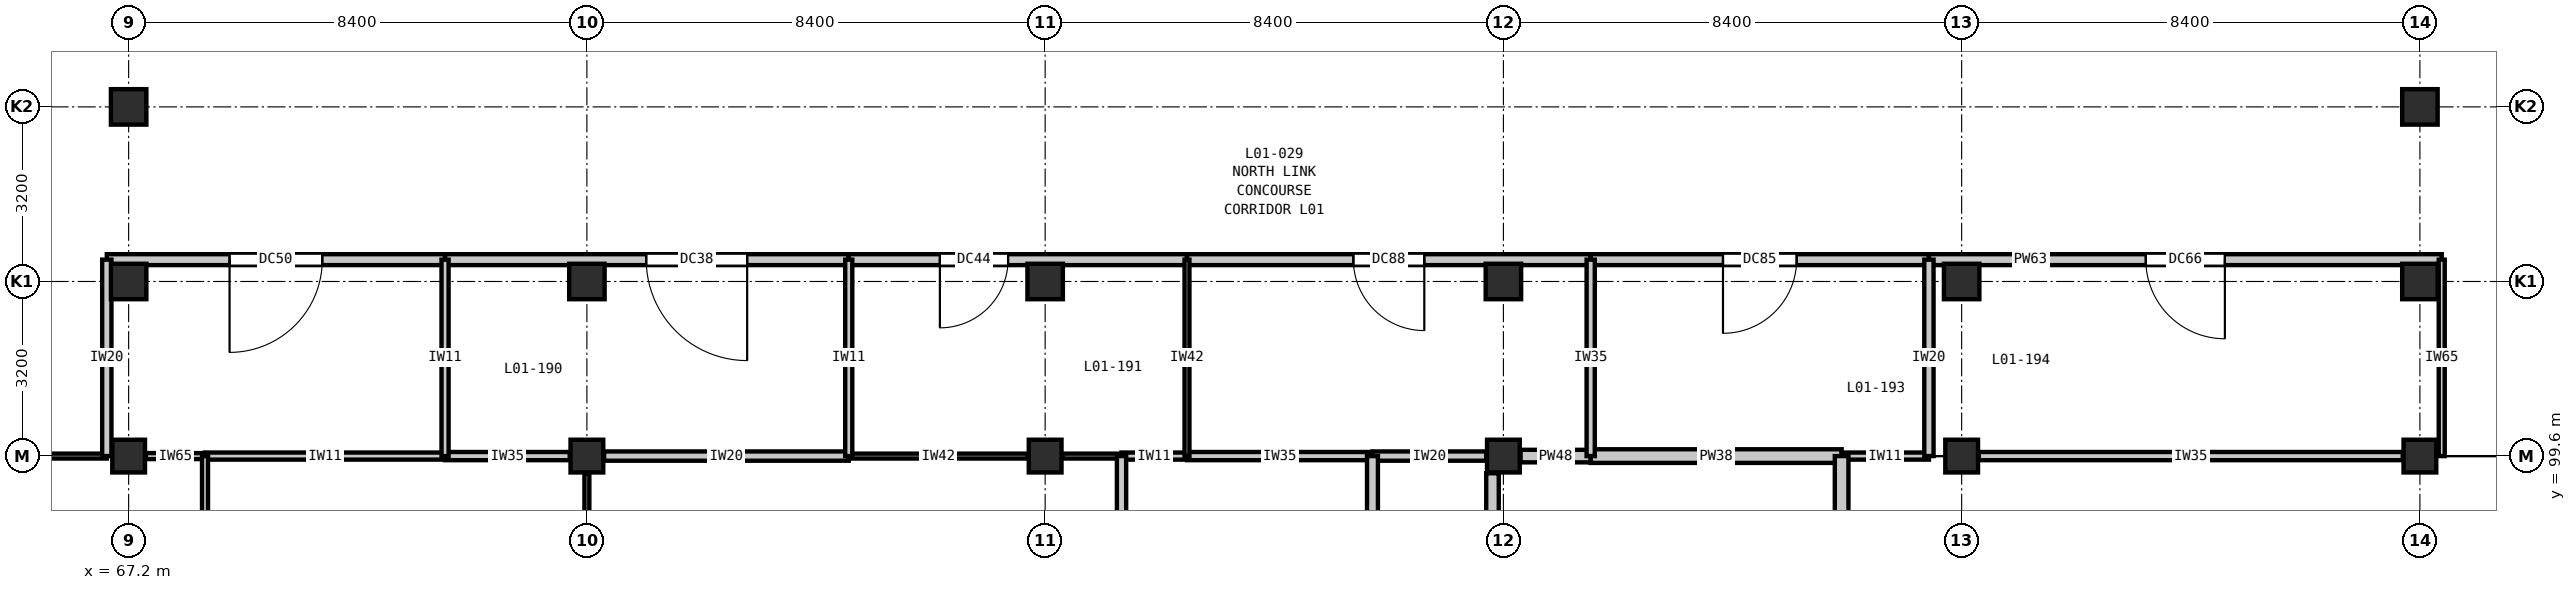
"""IFC4 building model, lengths in metres.
Left out: names, types, materials, properties, quantities, classifications, styles, units other than length and angle.
Written with IfcOpenShell. Run it as: python <this file> out.ifc"""

import sys

from ifc_helpers import new_model, si_unit, direction, frame, frame_2d, origin, origin_2d, place, context, subcontext, project, spatial, rectangle, extrude, element, fill, save


model = new_model("IFC4")
c1 = context("Model", 3, precision=1e-05, world=origin(), true_north=direction((0.0, 1.0)))
c2 = subcontext(c1, "Body", "Model", "MODEL_VIEW")
j1 = project(units=[si_unit("LENGTHUNIT", "METRE"), si_unit("PLANEANGLEUNIT", "RADIAN")], contexts=[c1])
p1 = place(None, origin())
s1 = spatial("IfcSite", under=j1, at=p1, CompositionType="ELEMENT")
p2 = place(p1, origin())
s2 = spatial("IfcBuilding", under=s1, at=p2, CompositionType="ELEMENT")
p3 = place(p2, frame((0.0, 0.0, 5.4)))
s3 = spatial("IfcBuildingStorey", under=s2, at=p3, CompositionType="ELEMENT", Elevation=5.4)
p4 = place(p3, frame((67.2, 99.6, 0.0), z_axis=(0.0, 0.0, 1.0), x_axis=(1.0, 0.0, 0.0)))
e1 = element("IfcColumn", 1, at=p4, inside=s3, PredefinedType="COLUMN", context=c2, shape_type="SweptSolid", body=[
    extrude(rectangle(XDim=0.6, YDim=0.6, at=origin_2d()), origin(), (0.0, 0.0, 1.0), 5.4),
])
for number, where, z_axis, x_axis in (
    (2, (67.2, 102.8, 0.0), (0.0, 0.0, 1.0), (1.0, 0.0, 0.0)),
    (3, (67.2, 106.0, 0.0), (0.0, 0.0, 1.0), (1.0, 0.0, 0.0)),
):
    element("IfcColumn", number, at=place(p3, frame(where, z_axis=z_axis, x_axis=x_axis)), inside=s3, PredefinedType="COLUMN", context=c2, shape_type="SweptSolid", body=[
        extrude(rectangle(XDim=0.65, YDim=0.65, at=origin_2d()), origin(), (0.0, 0.0, 1.0), 5.4),
    ])
p5 = place(p3, frame((75.6, 99.6, 0.0), z_axis=(0.0, 0.0, 1.0), x_axis=(1.0, 0.0, 0.0)))
e4 = element("IfcColumn", 4, at=p5, inside=s3, PredefinedType="COLUMN", context=c2, shape_type="SweptSolid", body=[
    extrude(rectangle(XDim=0.6, YDim=0.6, at=origin_2d()), origin(), (0.0, 0.0, 1.0), 5.4),
])
p6 = place(p3, frame((75.6, 102.8, 0.0), z_axis=(0.0, 0.0, 1.0), x_axis=(1.0, 0.0, 0.0)))
e5 = element("IfcColumn", 5, at=p6, inside=s3, PredefinedType="COLUMN", context=c2, shape_type="SweptSolid", body=[
    extrude(rectangle(XDim=0.65, YDim=0.65, at=origin_2d()), origin(), (0.0, 0.0, 1.0), 5.4),
])
p7 = place(p3, frame((84.0, 99.6, 0.0), z_axis=(0.0, 0.0, 1.0), x_axis=(1.0, 0.0, 0.0)))
e6 = element("IfcColumn", 6, at=p7, inside=s3, PredefinedType="COLUMN", context=c2, shape_type="SweptSolid", body=[
    extrude(rectangle(XDim=0.6, YDim=0.6, at=origin_2d()), origin(), (0.0, 0.0, 1.0), 5.4),
])
p8 = place(p3, frame((84.0, 102.8, 0.0), z_axis=(0.0, 0.0, 1.0), x_axis=(1.0, 0.0, 0.0)))
e7 = element("IfcColumn", 7, at=p8, inside=s3, PredefinedType="COLUMN", context=c2, shape_type="SweptSolid", body=[
    extrude(rectangle(XDim=0.65, YDim=0.65, at=origin_2d()), origin(), (0.0, 0.0, 1.0), 5.4),
])
p9 = place(p3, frame((92.4, 99.6, 0.0), z_axis=(0.0, 0.0, 1.0), x_axis=(1.0, 0.0, 0.0)))
e8 = element("IfcColumn", 8, at=p9, inside=s3, PredefinedType="COLUMN", context=c2, shape_type="SweptSolid", body=[
    extrude(rectangle(XDim=0.6, YDim=0.6, at=origin_2d()), origin(), (0.0, 0.0, 1.0), 5.4),
])
p10 = place(p3, frame((92.4, 102.8, 0.0), z_axis=(0.0, 0.0, 1.0), x_axis=(1.0, 0.0, 0.0)))
e9 = element("IfcColumn", 9, at=p10, inside=s3, PredefinedType="COLUMN", context=c2, shape_type="SweptSolid", body=[
    extrude(rectangle(XDim=0.65, YDim=0.65, at=origin_2d()), origin(), (0.0, 0.0, 1.0), 5.4),
])
p11 = place(p3, frame((100.8, 99.6, 0.0), z_axis=(0.0, 0.0, 1.0), x_axis=(1.0, 0.0, 0.0)))
e10 = element("IfcColumn", 10, at=p11, inside=s3, PredefinedType="COLUMN", context=c2, shape_type="SweptSolid", body=[
    extrude(rectangle(XDim=0.6, YDim=0.6, at=origin_2d()), origin(), (0.0, 0.0, 1.0), 5.4),
])
p12 = place(p3, frame((100.8, 102.8, 0.0), z_axis=(0.0, 0.0, 1.0), x_axis=(1.0, 0.0, 0.0)))
e11 = element("IfcColumn", 11, at=p12, inside=s3, PredefinedType="COLUMN", context=c2, shape_type="SweptSolid", body=[
    extrude(rectangle(XDim=0.65, YDim=0.65, at=origin_2d()), origin(), (0.0, 0.0, 1.0), 5.4),
])
p13 = place(p3, frame((109.2, 99.6, 0.0), z_axis=(0.0, 0.0, 1.0), x_axis=(1.0, 0.0, 0.0)))
e12 = element("IfcColumn", 12, at=p13, inside=s3, PredefinedType="COLUMN", context=c2, shape_type="SweptSolid", body=[
    extrude(rectangle(XDim=0.6, YDim=0.6, at=origin_2d()), origin(), (0.0, 0.0, 1.0), 5.4),
])
for number, where, z_axis, x_axis in (
    (13, (109.2, 102.8, 0.0), (0.0, 0.0, 1.0), (1.0, 0.0, 0.0)),
    (14, (109.2, 106.0, 0.0), (0.0, 0.0, 1.0), (1.0, 0.0, 0.0)),
):
    element("IfcColumn", number, at=place(p3, frame(where, z_axis=z_axis, x_axis=x_axis)), inside=s3, PredefinedType="COLUMN", context=c2, shape_type="SweptSolid", body=[
        extrude(rectangle(XDim=0.65, YDim=0.65, at=origin_2d()), origin(), (0.0, 0.0, 1.0), 5.4),
    ])
p14 = place(p3, frame((63.6, 99.6, 0.0), z_axis=(0.0, 0.0, 1.0), x_axis=(1.0, 0.0, 0.0)))
e15 = element("IfcWall", 15, at=p14, inside=s3, PredefinedType="PARTITIONING", context=c2, shape_type="SweptSolid", body=[
    extrude(rectangle(XDim=3.2, YDim=0.09, at=frame_2d((1.6, 0.0))), origin(), (0.0, 0.0, 1.0), 4.685),
])
p15 = place(p3, frame((67.515, 99.6, 0.0), z_axis=(0.0, 0.0, 1.0), x_axis=(1.0, 0.0, 0.0)))
e16 = element("IfcWall", 16, at=p15, inside=s3, PredefinedType="PARTITIONING", context=c2, shape_type="SweptSolid", body=[
    extrude(rectangle(XDim=1.085, YDim=0.11, at=frame_2d((0.542, 0.0))), origin(), (0.0, 0.0, 1.0), 4.685),
])
p16 = place(p3, frame((68.6, 99.6, 0.0), z_axis=(0.0, 0.0, 1.0), x_axis=(1.0, 0.0, 0.0)))
e17 = element("IfcWall", 17, at=p16, inside=s3, PredefinedType="PARTITIONING", context=c2, shape_type="SweptSolid", body=[
    extrude(rectangle(XDim=4.4, YDim=0.13, at=frame_2d((2.2, 0.0))), origin(), (0.0, 0.0, 1.0), 4.685),
])
p17 = place(p3, frame((73.0, 99.6, 0.0), z_axis=(0.0, 0.0, 1.0), x_axis=(1.0, 0.0, 0.0)))
e18 = element("IfcWall", 18, at=p17, inside=s3, PredefinedType="PARTITIONING", context=c2, shape_type="SweptSolid", body=[
    extrude(rectangle(XDim=2.285, YDim=0.15, at=frame_2d((1.143, 0.0))), origin(), (0.0, 0.0, 1.0), 4.685),
])
p18 = place(p3, frame((75.915, 99.6, 0.0), z_axis=(0.0, 0.0, 1.0), x_axis=(1.0, 0.0, 0.0)))
e19 = element("IfcWall", 19, at=p18, inside=s3, PredefinedType="PARTITIONING", context=c2, shape_type="SweptSolid", body=[
    extrude(rectangle(XDim=4.485, YDim=0.17, at=frame_2d((2.242, 0.0))), origin(), (0.0, 0.0, 1.0), 4.685),
])
p19 = place(p3, frame((80.4, 99.6, 0.0), z_axis=(0.0, 0.0, 1.0), x_axis=(1.0, 0.0, 0.0)))
e20 = element("IfcWall", 20, at=p19, inside=s3, PredefinedType="PARTITIONING", context=c2, shape_type="SweptSolid", body=[
    extrude(rectangle(XDim=3.285, YDim=0.09, at=frame_2d((1.643, 0.0))), origin(), (0.0, 0.0, 1.0), 4.685),
])
p20 = place(p3, frame((84.315, 99.6, 0.0), z_axis=(0.0, 0.0, 1.0), x_axis=(1.0, 0.0, 0.0)))
e21 = element("IfcWall", 21, at=p20, inside=s3, PredefinedType="PARTITIONING", context=c2, shape_type="SweptSolid", body=[
    extrude(rectangle(XDim=1.085, YDim=0.09, at=frame_2d((0.542, 0.0))), origin(), (0.0, 0.0, 1.0), 4.685),
])
p21 = place(p3, frame((85.4, 99.6, 0.0), z_axis=(0.0, 0.0, 1.0), x_axis=(1.0, 0.0, 0.0)))
e22 = element("IfcWall", 22, at=p21, inside=s3, PredefinedType="PARTITIONING", context=c2, shape_type="SweptSolid", body=[
    extrude(rectangle(XDim=1.2, YDim=0.13, at=frame_2d((0.6, 0.0))), origin(), (0.0, 0.0, 1.0), 4.685),
])
p22 = place(p3, frame((86.6, 99.6, 0.0), z_axis=(0.0, 0.0, 1.0), x_axis=(1.0, 0.0, 0.0)))
e23 = element("IfcWall", 23, at=p22, inside=s3, PredefinedType="PARTITIONING", context=c2, shape_type="SweptSolid", body=[
    extrude(rectangle(XDim=3.4, YDim=0.15, at=frame_2d((1.7, 0.0))), origin(), (0.0, 0.0, 1.0), 4.685),
])
p23 = place(p3, frame((90.0, 99.6, 0.0), z_axis=(0.0, 0.0, 1.0), x_axis=(1.0, 0.0, 0.0)))
e24 = element("IfcWall", 24, at=p23, inside=s3, PredefinedType="PARTITIONING", context=c2, shape_type="SweptSolid", body=[
    extrude(rectangle(XDim=2.085, YDim=0.17, at=frame_2d((1.042, 0.0))), origin(), (0.0, 0.0, 1.0), 4.685),
])
p24 = place(p3, frame((92.715, 99.6, 0.0), z_axis=(0.0, 0.0, 1.0), x_axis=(1.0, 0.0, 0.0)))
e25 = element("IfcWall", 25, at=p24, inside=s3, PredefinedType="PARTITIONING", context=c2, shape_type="SweptSolid", body=[
    extrude(rectangle(XDim=1.285, YDim=0.23, at=frame_2d((0.643, 0.0))), origin(), (0.0, 0.0, 1.0), 4.685),
])
p25 = place(p3, frame((94.0, 99.6, 0.0), z_axis=(0.0, 0.0, 1.0), x_axis=(1.0, 0.0, 0.0)))
e26 = element("IfcWall", 26, at=p25, inside=s3, PredefinedType="PARTITIONING", context=c2, shape_type="SweptSolid", body=[
    extrude(rectangle(XDim=4.6, YDim=0.25, at=frame_2d((2.3, 0.0))), origin(), (0.0, 0.0, 1.0), 4.685),
])
p26 = place(p3, frame((98.6, 99.6, 0.0), z_axis=(0.0, 0.0, 1.0), x_axis=(1.0, 0.0, 0.0)))
e27 = element("IfcWall", 27, at=p26, inside=s3, PredefinedType="PARTITIONING", context=c2, shape_type="SweptSolid", body=[
    extrude(rectangle(XDim=1.6, YDim=0.13, at=frame_2d((0.8, 0.0))), origin(), (0.0, 0.0, 1.0), 4.685),
])
p27 = place(p3, frame((101.115, 99.6, 0.0), z_axis=(0.0, 0.0, 1.0), x_axis=(1.0, 0.0, 0.0)))
e28 = element("IfcWall", 28, at=p27, inside=s3, PredefinedType="PARTITIONING", context=c2, shape_type="SweptSolid", body=[
    extrude(rectangle(XDim=7.77, YDim=0.15, at=frame_2d((3.885, 0.0))), origin(), (0.0, 0.0, 1.0), 4.685),
])
p28 = place(p3, frame((66.8, 103.2, 0.0), z_axis=(0.0, 0.0, 1.0), x_axis=(1.0, 0.0, 0.0)))
e29 = element("IfcWall", 29, at=p28, inside=s3, PredefinedType="PARTITIONING", context=c2, shape_type="SweptSolid", body=[
    extrude(rectangle(XDim=6.2, YDim=0.2, at=frame_2d((3.1, 0.0))), origin(), (0.0, 0.0, 1.0), 5.05),
])
p29 = place(p28, frame((2.25, 0.0, 0.0)))
e30 = element("IfcOpeningElement", 30, at=p29, cuts=e29, PredefinedType="OPENING", context=c2, shape_type="SweptSolid", body=[
    extrude(rectangle(XDim=1.7, YDim=2.3, at=frame_2d((0.85, 1.15))), frame((0.0, 0.11, 0.0), z_axis=(0.0, -1.0, 0.0), x_axis=(1.0, 0.0, 0.0)), (0.0, 0.0, 1.0), 0.22),
])
p30 = place(p3, frame((73.0, 103.2, 0.0), z_axis=(0.0, 0.0, 1.0), x_axis=(1.0, 0.0, 0.0)))
e31 = element("IfcWall", 31, at=p30, inside=s3, PredefinedType="PARTITIONING", context=c2, shape_type="SweptSolid", body=[
    extrude(rectangle(XDim=7.4, YDim=0.2, at=frame_2d((3.7, 0.0))), origin(), (0.0, 0.0, 1.0), 5.05),
])
p31 = place(p30, frame((3.688, 0.0, 0.0)))
e32 = element("IfcOpeningElement", 32, at=p31, cuts=e31, PredefinedType="OPENING", context=c2, shape_type="SweptSolid", body=[
    extrude(rectangle(XDim=1.85, YDim=2.3, at=frame_2d((0.925, 1.15))), frame((0.0, 0.11, 0.0), z_axis=(0.0, -1.0, 0.0), x_axis=(1.0, 0.0, 0.0)), (0.0, 0.0, 1.0), 0.22),
])
p32 = place(p3, frame((80.4, 103.2, 0.0), z_axis=(0.0, 0.0, 1.0), x_axis=(1.0, 0.0, 0.0)))
e33 = element("IfcWall", 33, at=p32, inside=s3, PredefinedType="PARTITIONING", context=c2, shape_type="SweptSolid", body=[
    extrude(rectangle(XDim=6.2, YDim=0.2, at=frame_2d((3.1, 0.0))), origin(), (0.0, 0.0, 1.0), 5.05),
])
p33 = place(p32, frame((1.67, 0.0, 0.0)))
e34 = element("IfcOpeningElement", 34, at=p33, cuts=e33, PredefinedType="OPENING", context=c2, shape_type="SweptSolid", body=[
    extrude(rectangle(XDim=1.25, YDim=2.15, at=frame_2d((0.625, 1.075))), frame((0.0, 0.11, 0.0), z_axis=(0.0, -1.0, 0.0), x_axis=(1.0, 0.0, 0.0)), (0.0, 0.0, 1.0), 0.22),
])
p34 = place(p3, frame((86.6, 103.2, 0.0), z_axis=(0.0, 0.0, 1.0), x_axis=(1.0, 0.0, 0.0)))
e35 = element("IfcWall", 35, at=p34, inside=s3, PredefinedType="PARTITIONING", context=c2, shape_type="SweptSolid", body=[
    extrude(rectangle(XDim=7.4, YDim=0.2, at=frame_2d((3.7, 0.0))), origin(), (0.0, 0.0, 1.0), 5.05),
])
p35 = place(p34, frame((3.05, 0.0, 0.0)))
e36 = element("IfcOpeningElement", 36, at=p35, cuts=e35, PredefinedType="OPENING", context=c2, shape_type="SweptSolid", body=[
    extrude(rectangle(XDim=1.3, YDim=2.2, at=frame_2d((0.65, 1.1))), frame((0.0, 0.11, 0.0), z_axis=(0.0, -1.0, 0.0), x_axis=(1.0, 0.0, 0.0)), (0.0, 0.0, 1.0), 0.22),
])
p36 = place(p3, frame((94.0, 103.2, 0.0), z_axis=(0.0, 0.0, 1.0), x_axis=(1.0, 0.0, 0.0)))
e37 = element("IfcWall", 37, at=p36, inside=s3, PredefinedType="PARTITIONING", context=c2, shape_type="SweptSolid", body=[
    extrude(rectangle(XDim=6.2, YDim=0.2, at=frame_2d((3.1, 0.0))), origin(), (0.0, 0.0, 1.0), 5.05),
])
p37 = place(p36, frame((2.425, 0.0, 0.0)))
e38 = element("IfcOpeningElement", 38, at=p37, cuts=e37, PredefinedType="OPENING", context=c2, shape_type="SweptSolid", body=[
    extrude(rectangle(XDim=1.35, YDim=2.2, at=frame_2d((0.675, 1.1))), frame((0.0, 0.11, 0.0), z_axis=(0.0, -1.0, 0.0), x_axis=(1.0, 0.0, 0.0)), (0.0, 0.0, 1.0), 0.22),
])
p38 = place(p3, frame((100.2, 103.2, 0.0), z_axis=(0.0, 0.0, 1.0), x_axis=(1.0, 0.0, 0.0)))
e39 = element("IfcWall", 39, at=p38, inside=s3, PredefinedType="PARTITIONING", context=c2, shape_type="SweptSolid", body=[
    extrude(rectangle(XDim=9.4, YDim=0.2, at=frame_2d((4.7, 0.0))), origin(), (0.0, 0.0, 1.0), 5.05),
])
p39 = place(p38, frame((3.975, 0.0, 0.0)))
e40 = element("IfcOpeningElement", 40, at=p39, cuts=e39, PredefinedType="OPENING", context=c2, shape_type="SweptSolid", body=[
    extrude(rectangle(XDim=1.45, YDim=2.25, at=frame_2d((0.725, 1.125))), frame((0.0, 0.11, 0.0), z_axis=(0.0, -1.0, 0.0), x_axis=(1.0, 0.0, 0.0)), (0.0, 0.0, 1.0), 0.22),
])
p40 = place(p3, frame((66.8, 99.6, 0.0), z_axis=(0.0, 0.0, 1.0), x_axis=(0.0, 1.0, 0.0)))
e41 = element("IfcWall", 41, at=p40, inside=s3, PredefinedType="PARTITIONING", context=c2, shape_type="SweptSolid", body=[
    extrude(rectangle(XDim=3.6, YDim=0.17, at=frame_2d((1.8, 0.0))), origin(), (0.0, 0.0, 1.0), 5.05),
])
p41 = place(p3, frame((68.6, 88.6, 0.0), z_axis=(0.0, 0.0, 1.0), x_axis=(0.0, 1.0, 0.0)))
e42 = element("IfcWall", 42, at=p41, inside=s3, PredefinedType="PARTITIONING", context=c2, shape_type="SweptSolid", body=[
    extrude(rectangle(XDim=11.0, YDim=0.11, at=frame_2d((5.5, 0.0))), origin(), (0.0, 0.0, 1.0), 5.05),
])
p42 = place(p3, frame((73.0, 99.6, 0.0), z_axis=(0.0, 0.0, 1.0), x_axis=(0.0, 1.0, 0.0)))
e43 = element("IfcWall", 43, at=p42, inside=s3, PredefinedType="PARTITIONING", context=c2, shape_type="SweptSolid", body=[
    extrude(rectangle(XDim=3.6, YDim=0.13, at=frame_2d((1.8, 0.0))), origin(), (0.0, 0.0, 1.0), 5.05),
])
p43 = place(p3, frame((75.6, 91.515, 0.0), z_axis=(0.0, 0.0, 1.0), x_axis=(0.0, 1.0, 0.0)))
e44 = element("IfcWall", 44, at=p43, inside=s3, PredefinedType="PARTITIONING", context=c2, shape_type="SweptSolid", body=[
    extrude(rectangle(XDim=7.77, YDim=0.09, at=frame_2d((3.885, 0.0))), origin(), (0.0, 0.0, 1.0), 4.735),
])
p44 = place(p3, frame((80.4, 99.6, 0.0), z_axis=(0.0, 0.0, 1.0), x_axis=(0.0, 1.0, 0.0)))
e45 = element("IfcWall", 45, at=p44, inside=s3, PredefinedType="PARTITIONING", context=c2, shape_type="SweptSolid", body=[
    extrude(rectangle(XDim=3.6, YDim=0.13, at=frame_2d((1.8, 0.0))), origin(), (0.0, 0.0, 1.0), 5.05),
])
p45 = place(p3, frame((85.4, 88.6, 0.0), z_axis=(0.0, 0.0, 1.0), x_axis=(0.0, 1.0, 0.0)))
e46 = element("IfcWall", 46, at=p45, inside=s3, PredefinedType="PARTITIONING", context=c2, shape_type="SweptSolid", body=[
    extrude(rectangle(XDim=11.0, YDim=0.17, at=frame_2d((5.5, 0.0))), origin(), (0.0, 0.0, 1.0), 5.05),
])
p46 = place(p3, frame((86.6, 99.6, 0.0), z_axis=(0.0, 0.0, 1.0), x_axis=(0.0, 1.0, 0.0)))
e47 = element("IfcWall", 47, at=p46, inside=s3, PredefinedType="PARTITIONING", context=c2, shape_type="SweptSolid", body=[
    extrude(rectangle(XDim=3.6, YDim=0.09, at=frame_2d((1.8, 0.0))), origin(), (0.0, 0.0, 1.0), 5.05),
])
p47 = place(p3, frame((90.0, 94.1, 0.0), z_axis=(0.0, 0.0, 1.0), x_axis=(0.0, 1.0, 0.0)))
e48 = element("IfcWall", 48, at=p47, inside=s3, PredefinedType="PARTITIONING", context=c2, shape_type="SweptSolid", body=[
    extrude(rectangle(XDim=5.5, YDim=0.2, at=frame_2d((2.75, 0.0))), origin(), (0.0, 0.0, 1.0), 5.05),
])
p48 = place(p47, frame((2.125, 0.0, 0.0)))
e49 = element("IfcOpeningElement", 49, at=p48, cuts=e48, PredefinedType="OPENING", context=c2, shape_type="SweptSolid", body=[
    extrude(rectangle(XDim=1.25, YDim=2.15, at=frame_2d((0.625, 1.075))), frame((0.0, 0.11, 0.0), z_axis=(0.0, -1.0, 0.0), x_axis=(1.0, 0.0, 0.0)), (0.0, 0.0, 1.0), 0.22),
])
p49 = place(p3, frame((92.2, 94.1, 0.0), z_axis=(0.0, 0.0, 1.0), x_axis=(0.0, 1.0, 0.0)))
e50 = element("IfcWall", 50, at=p49, inside=s3, PredefinedType="PARTITIONING", context=c2, shape_type="SweptSolid", body=[
    extrude(rectangle(XDim=5.185, YDim=0.23, at=frame_2d((2.592, 0.0))), origin(), (0.0, 0.0, 1.0), 4.735),
])
p50 = place(p3, frame((94.0, 99.6, 0.0), z_axis=(0.0, 0.0, 1.0), x_axis=(0.0, 1.0, 0.0)))
e51 = element("IfcWall", 51, at=p50, inside=s3, PredefinedType="PARTITIONING", context=c2, shape_type="SweptSolid", body=[
    extrude(rectangle(XDim=3.6, YDim=0.15, at=frame_2d((1.8, 0.0))), origin(), (0.0, 0.0, 1.0), 5.05),
])
p51 = place(p3, frame((98.6, 88.6, 0.0), z_axis=(0.0, 0.0, 1.0), x_axis=(0.0, 1.0, 0.0)))
e52 = element("IfcWall", 52, at=p51, inside=s3, PredefinedType="PARTITIONING", context=c2, shape_type="SweptSolid", body=[
    extrude(rectangle(XDim=11.0, YDim=0.25, at=frame_2d((5.5, 0.0))), origin(), (0.0, 0.0, 1.0), 5.05),
])
p52 = place(p3, frame((100.2, 99.6, 0.0), z_axis=(0.0, 0.0, 1.0), x_axis=(0.0, 1.0, 0.0)))
e53 = element("IfcWall", 53, at=p52, inside=s3, PredefinedType="PARTITIONING", context=c2, shape_type="SweptSolid", body=[
    extrude(rectangle(XDim=3.6, YDim=0.17, at=frame_2d((1.8, 0.0))), origin(), (0.0, 0.0, 1.0), 5.05),
])
p53 = place(p3, frame((109.6, 99.6, 0.0), z_axis=(0.0, 0.0, 1.0), x_axis=(0.0, 1.0, 0.0)))
e54 = element("IfcWall", 54, at=p53, inside=s3, PredefinedType="PARTITIONING", context=c2, shape_type="SweptSolid", body=[
    extrude(rectangle(XDim=3.6, YDim=0.11, at=frame_2d((1.8, 0.0))), origin(), (0.0, 0.0, 1.0), 5.05),
])
p54 = place(p29, frame((1.7, 0.0, 0.0), z_axis=(0.0, 0.0, 1.0), x_axis=(-1.0, 0.0, 0.0)))
e55 = element("IfcDoor", 55, at=p54, inside=s3, OperationType="SINGLE_SWING_RIGHT", PredefinedType="DOOR", context=c2, shape_type="SweptSolid", body=[
    extrude(rectangle(XDim=1.7, YDim=2.3, at=frame_2d((0.85, 1.15))), frame((0.0, 0.025, 0.0), z_axis=(0.0, -1.0, 0.0), x_axis=(1.0, 0.0, 0.0)), (0.0, 0.0, 1.0), 0.05),
])
fill(e30, e55)
p55 = place(p31, frame((1.85, 0.0, 0.0), z_axis=(0.0, 0.0, 1.0), x_axis=(-1.0, 0.0, 0.0)))
e56 = element("IfcDoor", 56, at=p55, inside=s3, OperationType="SINGLE_SWING_LEFT", PredefinedType="DOOR", context=c2, shape_type="SweptSolid", body=[
    extrude(rectangle(XDim=1.85, YDim=2.3, at=frame_2d((0.925, 1.15))), frame((0.0, 0.025, 0.0), z_axis=(0.0, -1.0, 0.0), x_axis=(1.0, 0.0, 0.0)), (0.0, 0.0, 1.0), 0.05),
])
fill(e32, e56)
p56 = place(p33, frame((1.25, 0.0, 0.0), z_axis=(0.0, 0.0, 1.0), x_axis=(-1.0, 0.0, 0.0)))
e57 = element("IfcDoor", 57, at=p56, inside=s3, OperationType="SINGLE_SWING_RIGHT", PredefinedType="DOOR", context=c2, shape_type="SweptSolid", body=[
    extrude(rectangle(XDim=1.25, YDim=2.15, at=frame_2d((0.625, 1.075))), frame((0.0, 0.025, 0.0), z_axis=(0.0, -1.0, 0.0), x_axis=(1.0, 0.0, 0.0)), (0.0, 0.0, 1.0), 0.05),
])
fill(e34, e57)
p57 = place(p35, frame((1.3, 0.0, 0.0), z_axis=(0.0, 0.0, 1.0), x_axis=(-1.0, 0.0, 0.0)))
e58 = element("IfcDoor", 58, at=p57, inside=s3, OperationType="SINGLE_SWING_LEFT", PredefinedType="DOOR", context=c2, shape_type="SweptSolid", body=[
    extrude(rectangle(XDim=1.3, YDim=2.2, at=frame_2d((0.65, 1.1))), frame((0.0, 0.025, 0.0), z_axis=(0.0, -1.0, 0.0), x_axis=(1.0, 0.0, 0.0)), (0.0, 0.0, 1.0), 0.05),
])
fill(e36, e58)
p58 = place(p37, frame((1.35, 0.0, 0.0), z_axis=(0.0, 0.0, 1.0), x_axis=(-1.0, 0.0, 0.0)))
e59 = element("IfcDoor", 59, at=p58, inside=s3, OperationType="SINGLE_SWING_RIGHT", PredefinedType="DOOR", context=c2, shape_type="SweptSolid", body=[
    extrude(rectangle(XDim=1.35, YDim=2.2, at=frame_2d((0.675, 1.1))), frame((0.0, 0.025, 0.0), z_axis=(0.0, -1.0, 0.0), x_axis=(1.0, 0.0, 0.0)), (0.0, 0.0, 1.0), 0.05),
])
fill(e38, e59)
p59 = place(p39, frame((1.45, 0.0, 0.0), z_axis=(0.0, 0.0, 1.0), x_axis=(-1.0, 0.0, 0.0)))
e60 = element("IfcDoor", 60, at=p59, inside=s3, OperationType="SINGLE_SWING_LEFT", PredefinedType="DOOR", context=c2, shape_type="SweptSolid", body=[
    extrude(rectangle(XDim=1.45, YDim=2.25, at=frame_2d((0.725, 1.125))), frame((0.0, 0.025, 0.0), z_axis=(0.0, -1.0, 0.0), x_axis=(1.0, 0.0, 0.0)), (0.0, 0.0, 1.0), 0.05),
])
fill(e40, e60)
save(model, sys.argv[1])
